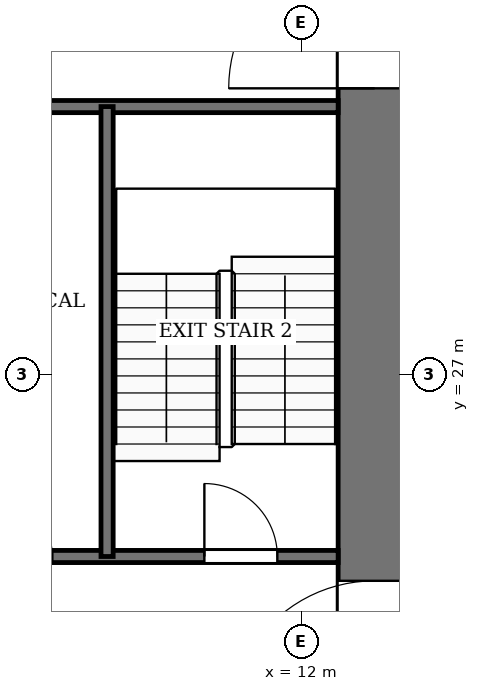
"""IFC4 building model, lengths in metres.
Left out: names, types, materials, properties, quantities, classifications, styles, units other than length and angle.
Written with IfcOpenShell. Run it as: python <this file> out.ifc"""

import sys

from ifc_helpers import new_model, si_unit, direction, frame, frame_2d, origin, place, context, subcontext, project, spatial, rectangle, extrude, element, fill, save


model = new_model("IFC4")
c1 = context("Model", 3, precision=1e-05, world=origin(), true_north=direction((0.0, 1.0)))
c2 = subcontext(c1, "Body", "Model", "MODEL_VIEW")
j1 = project(units=[si_unit("LENGTHUNIT", "METRE"), si_unit("PLANEANGLEUNIT", "RADIAN")], contexts=[c1])
p1 = place(None, origin())
s1 = spatial("IfcSite", under=j1, at=p1, CompositionType="ELEMENT")
p2 = place(p1, origin())
s2 = spatial("IfcBuilding", under=s1, at=p2, CompositionType="ELEMENT")
p3 = place(p2, frame((0.0, 0.0, 94.0)))
s3 = spatial("IfcBuildingStorey", under=s2, at=p3, CompositionType="ELEMENT", Elevation=94.0)
p4 = place(p3, frame((13.2, 18.4, -0.13), z_axis=(0.0, 0.0, 1.0), x_axis=(0.0, 1.0, 0.0)))
e1 = element("IfcWall", 1, at=p4, inside=s3, PredefinedType="SHEAR", context=c2, shape_type="SweptSolid", body=[
    extrude(rectangle(XDim=19.2, YDim=1.2, at=frame_2d((9.6, 0.0))), origin(), (0.0, 0.0, 1.0), 4.0),
])
p5 = place(p4, frame((2.8, 0.0, 0.13)))
e2 = element("IfcOpeningElement", 2, at=p5, cuts=e1, PredefinedType="OPENING", context=c2, shape_type="SweptSolid", body=[
    extrude(rectangle(XDim=2.4, YDim=2.4, at=frame_2d((1.2, 1.2))), frame((0.0, 0.61, 0.0), z_axis=(0.0, -1.0, 0.0), x_axis=(1.0, 0.0, 0.0)), (0.0, 0.0, 1.0), 1.22),
])
p6 = place(p4, frame((13.3, 0.0, 0.13)))
e3 = element("IfcOpeningElement", 3, at=p6, cuts=e1, PredefinedType="OPENING", context=c2, shape_type="SweptSolid", body=[
    extrude(rectangle(XDim=2.4, YDim=2.4, at=frame_2d((1.2, 1.2))), frame((0.0, 0.61, 0.0), z_axis=(0.0, -1.0, 0.0), x_axis=(1.0, 0.0, 0.0)), (0.0, 0.0, 1.0), 1.22),
])
p7 = place(p3, frame((6.0, 24.0, 0.0), z_axis=(0.0, 0.0, 1.0), x_axis=(1.0, 0.0, 0.0)))
e4 = element("IfcWall", 4, at=p7, inside=s3, PredefinedType="PARTITIONING", context=c2, shape_type="SweptSolid", body=[
    extrude(rectangle(XDim=6.6, YDim=0.2, at=frame_2d((3.3, 0.0))), origin(), (0.0, 0.0, 1.0), 3.87),
])
p8 = place(p7, frame((0.9, 0.0, 0.0)))
e5 = element("IfcOpeningElement", 5, at=p8, cuts=e4, PredefinedType="OPENING", context=c2, shape_type="SweptSolid", body=[
    extrude(rectangle(XDim=1.0, YDim=2.1, at=frame_2d((0.5, 1.05))), frame((0.0, 0.11, 0.0), z_axis=(0.0, -1.0, 0.0), x_axis=(1.0, 0.0, 0.0)), (0.0, 0.0, 1.0), 0.22),
])
p9 = place(p7, frame((4.4, 0.0, 0.0)))
e6 = element("IfcOpeningElement", 6, at=p9, cuts=e4, PredefinedType="OPENING", context=c2, shape_type="SweptSolid", body=[
    extrude(rectangle(XDim=1.2, YDim=2.2, at=frame_2d((0.6, 1.1))), frame((0.0, 0.11, 0.0), z_axis=(0.0, -1.0, 0.0), x_axis=(1.0, 0.0, 0.0)), (0.0, 0.0, 1.0), 0.22),
])
p10 = place(p3, frame((6.0, 31.4, 0.0), z_axis=(0.0, 0.0, 1.0), x_axis=(1.0, 0.0, 0.0)))
e7 = element("IfcWall", 7, at=p10, inside=s3, PredefinedType="PARTITIONING", context=c2, shape_type="SweptSolid", body=[
    extrude(rectangle(XDim=6.6, YDim=0.2, at=frame_2d((3.3, 0.0))), origin(), (0.0, 0.0, 1.0), 3.87),
])
p11 = place(p3, frame((8.8, 24.0, 0.0), z_axis=(0.0, 0.0, 1.0), x_axis=(0.0, 1.0, 0.0)))
e8 = element("IfcWall", 8, at=p11, inside=s3, PredefinedType="PARTITIONING", context=c2, shape_type="SweptSolid", body=[
    extrude(rectangle(XDim=7.4, YDim=0.2, at=frame_2d((3.7, 0.0))), origin(), (0.0, 0.0, 1.0), 3.87),
])
p12 = place(p9, origin())
e9 = element("IfcDoor", 9, at=p12, inside=s3, OperationType="SINGLE_SWING_LEFT", PredefinedType="DOOR", context=c2, shape_type="SweptSolid", body=[
    extrude(rectangle(XDim=1.2, YDim=2.2, at=frame_2d((0.6, 1.1))), frame((0.0, 0.025, 0.0), z_axis=(0.0, -1.0, 0.0), x_axis=(1.0, 0.0, 0.0)), (0.0, 0.0, 1.0), 0.05),
])
fill(e6, e9)
p13 = place(p5, origin())
e10 = element("IfcDoor", 10, at=p13, inside=s3, OperationType="DOUBLE_DOOR_SINGLE_SWING", PredefinedType="DOOR", context=c2, shape_type="SweptSolid", body=[
    extrude(rectangle(XDim=2.4, YDim=2.4, at=frame_2d((1.2, 1.2))), frame((0.0, 0.025, 0.0), z_axis=(0.0, -1.0, 0.0), x_axis=(1.0, 0.0, 0.0)), (0.0, 0.0, 1.0), 0.05),
])
fill(e2, e10)
p14 = place(p6, origin())
e11 = element("IfcDoor", 11, at=p14, inside=s3, OperationType="DOUBLE_DOOR_SINGLE_SWING", PredefinedType="DOOR", context=c2, shape_type="SweptSolid", body=[
    extrude(rectangle(XDim=2.4, YDim=2.4, at=frame_2d((1.2, 1.2))), frame((0.0, 0.025, 0.0), z_axis=(0.0, -1.0, 0.0), x_axis=(1.0, 0.0, 0.0)), (0.0, 0.0, 1.0), 0.05),
])
fill(e3, e11)
save(model, sys.argv[1])
